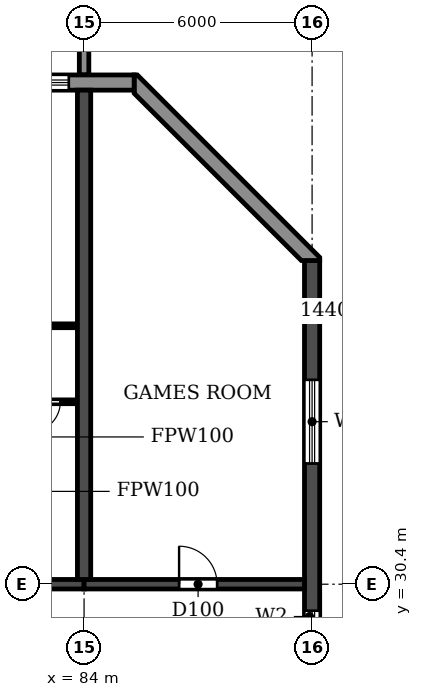
"""IFC4 building model, lengths in metres.
Left out: names, types, materials, properties, quantities, classifications, styles, units other than length and angle.
Written with IfcOpenShell. Run it as: python <this file> out.ifc"""

import sys

from ifc_helpers import new_model, si_unit, direction, frame, frame_2d, origin, place, context, subcontext, project, spatial, polyline, rectangle, outline, extrude, source, transform, mapped, element, fill, save


model = new_model("IFC4")
c1 = context("Model", 3, precision=1e-05, world=origin(), true_north=direction((0.0, 1.0)))
c2 = subcontext(c1, "Body", "Model", "MODEL_VIEW")
j1 = project(units=[si_unit("LENGTHUNIT", "METRE"), si_unit("PLANEANGLEUNIT", "RADIAN")], contexts=[c1])
p1 = place(None, origin())
s1 = spatial("IfcSite", under=j1, at=p1, CompositionType="ELEMENT")
p2 = place(p1, origin())
s2 = spatial("IfcBuilding", under=s1, at=p2, CompositionType="ELEMENT")
p3 = place(p2, frame((0.0, 0.0, 112.5)))
s3 = spatial("IfcBuildingStorey", under=s2, at=p3, CompositionType="ELEMENT", Elevation=112.5)
p4 = place(p3, frame((84.0, 30.525, 0.0), z_axis=(0.0, 0.0, 1.0), x_axis=(0.0, 1.0, 0.0)))
e1 = element("IfcWall", 1, at=p4, inside=s3, PredefinedType="SHEAR", context=c2, shape_type="SweptSolid", body=[
    extrude(rectangle(XDim=12.875, YDim=0.35, at=frame_2d((6.438, 0.0))), origin(), (0.0, 0.0, 1.0), 2.95),
])
p5 = place(p3, frame((90.0, 4.683, 0.0), z_axis=(0.0, 0.0, 1.0), x_axis=(0.0, 1.0, 0.0)))
e2 = element("IfcWall", 2, at=p5, inside=s3, PredefinedType="SHEAR", context=c2, shape_type="SweptSolid", body=[
    extrude(rectangle(XDim=34.234, YDim=0.4, at=frame_2d((17.117, 0.0))), origin(), (0.0, 0.0, 1.0), 2.95),
])
p6 = place(p5, frame((15.917, 0.0, 0.9)))
e3 = element("IfcOpeningElement", 3, at=p6, cuts=e2, PredefinedType="OPENING", context=c2, shape_type="SweptSolid", body=[
    extrude(rectangle(XDim=1.2, YDim=1.5, at=frame_2d((0.6, 0.75))), frame((0.0, 0.21, 0.0), z_axis=(0.0, -1.0, 0.0), x_axis=(1.0, 0.0, 0.0)), (0.0, 0.0, 1.0), 0.42),
])
p7 = place(p5, frame((23.817, 0.0, 0.9)))
e4 = element("IfcOpeningElement", 4, at=p7, cuts=e2, PredefinedType="OPENING", context=c2, shape_type="SweptSolid", body=[
    extrude(rectangle(XDim=1.2, YDim=1.5, at=frame_2d((0.6, 0.75))), frame((0.0, 0.21, 0.0), z_axis=(0.0, -1.0, 0.0), x_axis=(1.0, 0.0, 0.0)), (0.0, 0.0, 1.0), 0.42),
])
p8 = place(p5, frame((8.017, 0.0, 0.9)))
e5 = element("IfcOpeningElement", 5, at=p8, cuts=e2, PredefinedType="OPENING", context=c2, shape_type="SweptSolid", body=[
    extrude(rectangle(XDim=1.2, YDim=1.5, at=frame_2d((0.6, 0.75))), frame((0.0, 0.21, 0.0), z_axis=(0.0, -1.0, 0.0), x_axis=(1.0, 0.0, 0.0)), (0.0, 0.0, 1.0), 0.42),
])
p9 = place(p5, frame((28.894, 0.0, 0.6)))
e6 = element("IfcOpeningElement", 6, at=p9, cuts=e2, PredefinedType="OPENING", context=c2, shape_type="SweptSolid", body=[
    extrude(rectangle(XDim=2.2, YDim=1.8, at=frame_2d((1.1, 0.9))), frame((0.0, 0.21, 0.0), z_axis=(0.0, -1.0, 0.0), x_axis=(1.0, 0.0, 0.0)), (0.0, 0.0, 1.0), 0.42),
])
p10 = place(p5, frame((2.541, 0.0, 0.6)))
e7 = element("IfcOpeningElement", 7, at=p10, cuts=e2, PredefinedType="OPENING", context=c2, shape_type="SweptSolid", body=[
    extrude(rectangle(XDim=2.2, YDim=1.8, at=frame_2d((1.1, 0.9))), frame((0.0, 0.21, 0.0), z_axis=(0.0, -1.0, 0.0), x_axis=(1.0, 0.0, 0.0)), (0.0, 0.0, 1.0), 0.42),
])
p11 = place(p3, frame((78.0, 30.4, 0.0), z_axis=(0.0, 0.0, 1.0), x_axis=(1.0, 0.0, 0.0)))
e8 = element("IfcWall", 8, at=p11, inside=s3, PredefinedType="SHEAR", context=c2, shape_type="SweptSolid", body=[
    extrude(rectangle(XDim=6.0, YDim=0.25, at=frame_2d((3.0, 0.0))), origin(), (0.0, 0.0, 1.0), 2.35),
])
p12 = place(p11, frame((2.55, 0.0, 0.0)))
e9 = element("IfcOpeningElement", 9, at=p12, cuts=e8, PredefinedType="OPENING", context=c2, shape_type="SweptSolid", body=[
    extrude(rectangle(XDim=1.0, YDim=2.1, at=frame_2d((0.5, 1.05))), frame((0.0, 0.135, 0.0), z_axis=(0.0, -1.0, 0.0), x_axis=(1.0, 0.0, 0.0)), (0.0, 0.0, 1.0), 0.27),
])
p13 = place(p3, frame((84.0, 30.4, 0.0), z_axis=(0.0, 0.0, 1.0), x_axis=(1.0, 0.0, 0.0)))
e10 = element("IfcWall", 10, at=p13, inside=s3, PredefinedType="SHEAR", context=c2, shape_type="SweptSolid", body=[
    extrude(rectangle(XDim=5.8, YDim=0.25, at=frame_2d((2.9, 0.0))), origin(), (0.0, 0.0, 1.0), 2.35),
])
p14 = place(p13, frame((2.5, 0.0, 0.0)))
e11 = element("IfcOpeningElement", 11, at=p14, cuts=e10, PredefinedType="OPENING", context=c2, shape_type="SweptSolid", body=[
    extrude(rectangle(XDim=1.0, YDim=2.1, at=frame_2d((0.5, 1.05))), frame((0.0, 0.135, 0.0), z_axis=(0.0, -1.0, 0.0), x_axis=(1.0, 0.0, 0.0)), (0.0, 0.0, 1.0), 0.27),
])
p15 = place(p3, origin())
e12 = element("IfcWall", 12, at=p15, inside=s3, PredefinedType="STANDARD", context=c2, shape_type="SweptSolid", body=[
    extrude(outline(polyline([(90.2, 38.917), (90.2, 39.0), (85.4, 43.8), (85.317, 43.8), (85.317, 43.317), (89.717, 38.917), (90.2, 38.917)])), origin(), (0.0, 0.0, 1.0), 2.95),
])
p16 = place(p3, frame((85.317, 43.6, 0.0), z_axis=(0.0, 0.0, 1.0), x_axis=(-1.0, 0.0, 0.0)))
e13 = element("IfcWall", 13, at=p16, inside=s3, PredefinedType="STANDARD", context=c2, shape_type="SweptSolid", body=[
    extrude(rectangle(XDim=68.634, YDim=0.4, at=frame_2d((34.317, 0.0))), origin(), (0.0, 0.0, 1.0), 2.95),
])
p17 = place(p16, frame((64.917, 0.0, 0.0)))
e14 = element("IfcOpeningElement", 14, at=p17, cuts=e13, PredefinedType="OPENING", context=c2, shape_type="SweptSolid", body=[
    extrude(rectangle(XDim=1.8, YDim=2.4, at=frame_2d((0.9, 1.2))), frame((0.0, 0.21, 0.0), z_axis=(0.0, -1.0, 0.0), x_axis=(1.0, 0.0, 0.0)), (0.0, 0.0, 1.0), 0.42),
])
p18 = place(p16, frame((61.717, 0.0, 0.9)))
e15 = element("IfcOpeningElement", 15, at=p18, cuts=e13, PredefinedType="OPENING", context=c2, shape_type="SweptSolid", body=[
    extrude(rectangle(XDim=2.2, YDim=1.5, at=frame_2d((1.1, 0.75))), frame((0.0, 0.21, 0.0), z_axis=(0.0, -1.0, 0.0), x_axis=(1.0, 0.0, 0.0)), (0.0, 0.0, 1.0), 0.42),
])
p19 = place(p16, frame((58.717, 0.0, 0.9)))
e16 = element("IfcOpeningElement", 16, at=p19, cuts=e13, PredefinedType="OPENING", context=c2, shape_type="SweptSolid", body=[
    extrude(rectangle(XDim=2.2, YDim=1.5, at=frame_2d((1.1, 0.75))), frame((0.0, 0.21, 0.0), z_axis=(0.0, -1.0, 0.0), x_axis=(1.0, 0.0, 0.0)), (0.0, 0.0, 1.0), 0.42),
])
p20 = place(p16, frame((55.917, 0.0, 0.0)))
e17 = element("IfcOpeningElement", 17, at=p20, cuts=e13, PredefinedType="OPENING", context=c2, shape_type="SweptSolid", body=[
    extrude(rectangle(XDim=1.8, YDim=2.4, at=frame_2d((0.9, 1.2))), frame((0.0, 0.21, 0.0), z_axis=(0.0, -1.0, 0.0), x_axis=(1.0, 0.0, 0.0)), (0.0, 0.0, 1.0), 0.42),
])
p21 = place(p16, frame((52.917, 0.0, 0.0)))
e18 = element("IfcOpeningElement", 18, at=p21, cuts=e13, PredefinedType="OPENING", context=c2, shape_type="SweptSolid", body=[
    extrude(rectangle(XDim=1.8, YDim=2.4, at=frame_2d((0.9, 1.2))), frame((0.0, 0.21, 0.0), z_axis=(0.0, -1.0, 0.0), x_axis=(1.0, 0.0, 0.0)), (0.0, 0.0, 1.0), 0.42),
])
p22 = place(p16, frame((49.717, 0.0, 0.9)))
e19 = element("IfcOpeningElement", 19, at=p22, cuts=e13, PredefinedType="OPENING", context=c2, shape_type="SweptSolid", body=[
    extrude(rectangle(XDim=2.2, YDim=1.5, at=frame_2d((1.1, 0.75))), frame((0.0, 0.21, 0.0), z_axis=(0.0, -1.0, 0.0), x_axis=(1.0, 0.0, 0.0)), (0.0, 0.0, 1.0), 0.42),
])
p23 = place(p16, frame((46.717, 0.0, 0.9)))
e20 = element("IfcOpeningElement", 20, at=p23, cuts=e13, PredefinedType="OPENING", context=c2, shape_type="SweptSolid", body=[
    extrude(rectangle(XDim=2.2, YDim=1.5, at=frame_2d((1.1, 0.75))), frame((0.0, 0.21, 0.0), z_axis=(0.0, -1.0, 0.0), x_axis=(1.0, 0.0, 0.0)), (0.0, 0.0, 1.0), 0.42),
])
p24 = place(p16, frame((43.917, 0.0, 0.0)))
e21 = element("IfcOpeningElement", 21, at=p24, cuts=e13, PredefinedType="OPENING", context=c2, shape_type="SweptSolid", body=[
    extrude(rectangle(XDim=1.8, YDim=2.4, at=frame_2d((0.9, 1.2))), frame((0.0, 0.21, 0.0), z_axis=(0.0, -1.0, 0.0), x_axis=(1.0, 0.0, 0.0)), (0.0, 0.0, 1.0), 0.42),
])
p25 = place(p16, frame((40.717, 0.0, 0.9)))
e22 = element("IfcOpeningElement", 22, at=p25, cuts=e13, PredefinedType="OPENING", context=c2, shape_type="SweptSolid", body=[
    extrude(rectangle(XDim=2.2, YDim=1.5, at=frame_2d((1.1, 0.75))), frame((0.0, 0.21, 0.0), z_axis=(0.0, -1.0, 0.0), x_axis=(1.0, 0.0, 0.0)), (0.0, 0.0, 1.0), 0.42),
])
p26 = place(p16, frame((37.717, 0.0, 0.9)))
e23 = element("IfcOpeningElement", 23, at=p26, cuts=e13, PredefinedType="OPENING", context=c2, shape_type="SweptSolid", body=[
    extrude(rectangle(XDim=2.2, YDim=1.5, at=frame_2d((1.1, 0.75))), frame((0.0, 0.21, 0.0), z_axis=(0.0, -1.0, 0.0), x_axis=(1.0, 0.0, 0.0)), (0.0, 0.0, 1.0), 0.42),
])
p27 = place(p16, frame((34.917, 0.0, 0.0)))
e24 = element("IfcOpeningElement", 24, at=p27, cuts=e13, PredefinedType="OPENING", context=c2, shape_type="SweptSolid", body=[
    extrude(rectangle(XDim=1.8, YDim=2.4, at=frame_2d((0.9, 1.2))), frame((0.0, 0.21, 0.0), z_axis=(0.0, -1.0, 0.0), x_axis=(1.0, 0.0, 0.0)), (0.0, 0.0, 1.0), 0.42),
])
p28 = place(p16, frame((31.717, 0.0, 0.9)))
e25 = element("IfcOpeningElement", 25, at=p28, cuts=e13, PredefinedType="OPENING", context=c2, shape_type="SweptSolid", body=[
    extrude(rectangle(XDim=2.2, YDim=1.5, at=frame_2d((1.1, 0.75))), frame((0.0, 0.21, 0.0), z_axis=(0.0, -1.0, 0.0), x_axis=(1.0, 0.0, 0.0)), (0.0, 0.0, 1.0), 0.42),
])
p29 = place(p16, frame((28.917, 0.0, 0.0)))
e26 = element("IfcOpeningElement", 26, at=p29, cuts=e13, PredefinedType="OPENING", context=c2, shape_type="SweptSolid", body=[
    extrude(rectangle(XDim=1.8, YDim=2.4, at=frame_2d((0.9, 1.2))), frame((0.0, 0.21, 0.0), z_axis=(0.0, -1.0, 0.0), x_axis=(1.0, 0.0, 0.0)), (0.0, 0.0, 1.0), 0.42),
])
p30 = place(p16, frame((25.717, 0.0, 0.9)))
e27 = element("IfcOpeningElement", 27, at=p30, cuts=e13, PredefinedType="OPENING", context=c2, shape_type="SweptSolid", body=[
    extrude(rectangle(XDim=2.2, YDim=1.5, at=frame_2d((1.1, 0.75))), frame((0.0, 0.21, 0.0), z_axis=(0.0, -1.0, 0.0), x_axis=(1.0, 0.0, 0.0)), (0.0, 0.0, 1.0), 0.42),
])
p31 = place(p16, frame((22.717, 0.0, 0.9)))
e28 = element("IfcOpeningElement", 28, at=p31, cuts=e13, PredefinedType="OPENING", context=c2, shape_type="SweptSolid", body=[
    extrude(rectangle(XDim=2.2, YDim=1.5, at=frame_2d((1.1, 0.75))), frame((0.0, 0.21, 0.0), z_axis=(0.0, -1.0, 0.0), x_axis=(1.0, 0.0, 0.0)), (0.0, 0.0, 1.0), 0.42),
])
p32 = place(p16, frame((19.917, 0.0, 0.0)))
e29 = element("IfcOpeningElement", 29, at=p32, cuts=e13, PredefinedType="OPENING", context=c2, shape_type="SweptSolid", body=[
    extrude(rectangle(XDim=1.8, YDim=2.4, at=frame_2d((0.9, 1.2))), frame((0.0, 0.21, 0.0), z_axis=(0.0, -1.0, 0.0), x_axis=(1.0, 0.0, 0.0)), (0.0, 0.0, 1.0), 0.42),
])
p33 = place(p16, frame((16.717, 0.0, 0.9)))
e30 = element("IfcOpeningElement", 30, at=p33, cuts=e13, PredefinedType="OPENING", context=c2, shape_type="SweptSolid", body=[
    extrude(rectangle(XDim=2.2, YDim=1.5, at=frame_2d((1.1, 0.75))), frame((0.0, 0.21, 0.0), z_axis=(0.0, -1.0, 0.0), x_axis=(1.0, 0.0, 0.0)), (0.0, 0.0, 1.0), 0.42),
])
p34 = place(p16, frame((13.917, 0.0, 0.0)))
e31 = element("IfcOpeningElement", 31, at=p34, cuts=e13, PredefinedType="OPENING", context=c2, shape_type="SweptSolid", body=[
    extrude(rectangle(XDim=1.8, YDim=2.4, at=frame_2d((0.9, 1.2))), frame((0.0, 0.21, 0.0), z_axis=(0.0, -1.0, 0.0), x_axis=(1.0, 0.0, 0.0)), (0.0, 0.0, 1.0), 0.42),
])
p35 = place(p16, frame((10.717, 0.0, 0.9)))
e32 = element("IfcOpeningElement", 32, at=p35, cuts=e13, PredefinedType="OPENING", context=c2, shape_type="SweptSolid", body=[
    extrude(rectangle(XDim=2.2, YDim=1.5, at=frame_2d((1.1, 0.75))), frame((0.0, 0.21, 0.0), z_axis=(0.0, -1.0, 0.0), x_axis=(1.0, 0.0, 0.0)), (0.0, 0.0, 1.0), 0.42),
])
p36 = place(p16, frame((7.717, 0.0, 0.9)))
e33 = element("IfcOpeningElement", 33, at=p36, cuts=e13, PredefinedType="OPENING", context=c2, shape_type="SweptSolid", body=[
    extrude(rectangle(XDim=2.2, YDim=1.5, at=frame_2d((1.1, 0.75))), frame((0.0, 0.21, 0.0), z_axis=(0.0, -1.0, 0.0), x_axis=(1.0, 0.0, 0.0)), (0.0, 0.0, 1.0), 0.42),
])
p37 = place(p16, frame((4.917, 0.0, 0.0)))
e34 = element("IfcOpeningElement", 34, at=p37, cuts=e13, PredefinedType="OPENING", context=c2, shape_type="SweptSolid", body=[
    extrude(rectangle(XDim=1.8, YDim=2.4, at=frame_2d((0.9, 1.2))), frame((0.0, 0.21, 0.0), z_axis=(0.0, -1.0, 0.0), x_axis=(1.0, 0.0, 0.0)), (0.0, 0.0, 1.0), 0.42),
])
p38 = place(p16, frame((1.717, 0.0, 0.9)))
e35 = element("IfcOpeningElement", 35, at=p38, cuts=e13, PredefinedType="OPENING", context=c2, shape_type="SweptSolid", body=[
    extrude(rectangle(XDim=2.2, YDim=1.5, at=frame_2d((1.1, 0.75))), frame((0.0, 0.21, 0.0), z_axis=(0.0, -1.0, 0.0), x_axis=(1.0, 0.0, 0.0)), (0.0, 0.0, 1.0), 0.42),
])
m1 = source(origin(), c2, "Body", "SweptSolid", [
    extrude(outline(polyline([(0.0, 0.0), (0.25, 0.0), (0.25, 3.1), (0.0, 3.1), (0.0, 0.0)])), origin(), (0.0, 0.0, 1.0), 3.1),
])
p39 = place(p3, frame((83.875, 43.8, 0.0)))
e36 = element("IfcWall", 36, at=p39, inside=s3, PredefinedType="STANDARD", context=c2, shape_type="MappedRepresentation", body=[
    mapped(m1, transform((0.0, 0.0, 0.0))),
])
p40 = place(p3, frame((81.9, 35.2, 0.0), z_axis=(0.0, 0.0, 1.0), x_axis=(1.0, 0.0, 0.0)))
e37 = element("IfcWall", 37, at=p40, inside=s3, PredefinedType="PARTITIONING", context=c2, shape_type="SweptSolid", body=[
    extrude(rectangle(XDim=1.915, YDim=0.1, at=frame_2d((0.958, 0.0))), origin(), (0.0, 0.0, 1.0), 2.95),
])
p41 = place(p40, frame((0.675, 0.0, 0.0)))
e38 = element("IfcOpeningElement", 38, at=p41, cuts=e37, PredefinedType="OPENING", context=c2, shape_type="SweptSolid", body=[
    extrude(rectangle(XDim=0.8, YDim=2.1, at=frame_2d((0.4, 1.05))), frame((0.0, 0.06, 0.0), z_axis=(0.0, -1.0, 0.0), x_axis=(1.0, 0.0, 0.0)), (0.0, 0.0, 1.0), 0.12),
])
p42 = place(p3, frame((80.95, 37.2, 0.0), z_axis=(0.0, 0.0, 1.0), x_axis=(1.0, 0.0, 0.0)))
e39 = element("IfcWall", 39, at=p42, inside=s3, PredefinedType="PARTITIONING", context=c2, shape_type="SweptSolid", body=[
    extrude(rectangle(XDim=2.865, YDim=0.1, at=frame_2d((1.433, 0.0))), origin(), (0.0, 0.0, 1.0), 2.95),
])
p43 = place(p42, frame((0.55, 0.0, 0.0)))
e40 = element("IfcOpeningElement", 40, at=p43, cuts=e39, PredefinedType="OPENING", context=c2, shape_type="SweptSolid", body=[
    extrude(rectangle(XDim=0.9, YDim=2.1, at=frame_2d((0.45, 1.05))), frame((0.0, 0.06, 0.0), z_axis=(0.0, -1.0, 0.0), x_axis=(1.0, 0.0, 0.0)), (0.0, 0.0, 1.0), 0.12),
])
p44 = place(p7, origin())
e41 = element("IfcWindow", 41, at=p44, inside=s3, PartitioningType="SINGLE_PANEL", PredefinedType="WINDOW", context=c2, shape_type="SweptSolid", body=[
    extrude(rectangle(XDim=1.2, YDim=1.5, at=frame_2d((0.6, 0.75))), frame((0.0, 0.03, 0.0), z_axis=(0.0, -1.0, 0.0), x_axis=(1.0, 0.0, 0.0)), (0.0, 0.0, 1.0), 0.06),
])
fill(e4, e41)
p45 = place(p9, origin())
e42 = element("IfcWindow", 42, at=p45, inside=s3, PartitioningType="DOUBLE_PANEL_HORIZONTAL", PredefinedType="WINDOW", context=c2, shape_type="SweptSolid", body=[
    extrude(rectangle(XDim=2.2, YDim=1.8, at=frame_2d((1.1, 0.9))), frame((0.0, 0.03, 0.0), z_axis=(0.0, -1.0, 0.0), x_axis=(1.0, 0.0, 0.0)), (0.0, 0.0, 1.0), 0.06),
])
fill(e6, e42)
p46 = place(p38, origin())
e43 = element("IfcWindow", 43, at=p46, inside=s3, PartitioningType="DOUBLE_PANEL_HORIZONTAL", PredefinedType="WINDOW", context=c2, shape_type="SweptSolid", body=[
    extrude(rectangle(XDim=2.2, YDim=1.5, at=frame_2d((1.1, 0.75))), frame((0.0, 0.03, 0.0), z_axis=(0.0, -1.0, 0.0), x_axis=(1.0, 0.0, 0.0)), (0.0, 0.0, 1.0), 0.06),
])
fill(e35, e43)
p47 = place(p41, frame((0.8, 0.0, 0.0), z_axis=(0.0, 0.0, 1.0), x_axis=(-1.0, 0.0, 0.0)))
e44 = element("IfcDoor", 44, at=p47, inside=s3, OperationType="SINGLE_SWING_RIGHT", PredefinedType="DOOR", context=c2, shape_type="SweptSolid", body=[
    extrude(rectangle(XDim=0.8, YDim=2.1, at=frame_2d((0.4, 1.05))), frame((0.0, 0.025, 0.0), z_axis=(0.0, -1.0, 0.0), x_axis=(1.0, 0.0, 0.0)), (0.0, 0.0, 1.0), 0.05),
])
fill(e38, e44)
p48 = place(p14, origin())
e45 = element("IfcDoor", 45, at=p48, inside=s3, OperationType="SINGLE_SWING_LEFT", PredefinedType="DOOR", context=c2, shape_type="SweptSolid", body=[
    extrude(rectangle(XDim=1.0, YDim=2.1, at=frame_2d((0.5, 1.05))), frame((0.0, 0.025, 0.0), z_axis=(0.0, -1.0, 0.0), x_axis=(1.0, 0.0, 0.0)), (0.0, 0.0, 1.0), 0.05),
])
fill(e11, e45)
save(model, sys.argv[1])
